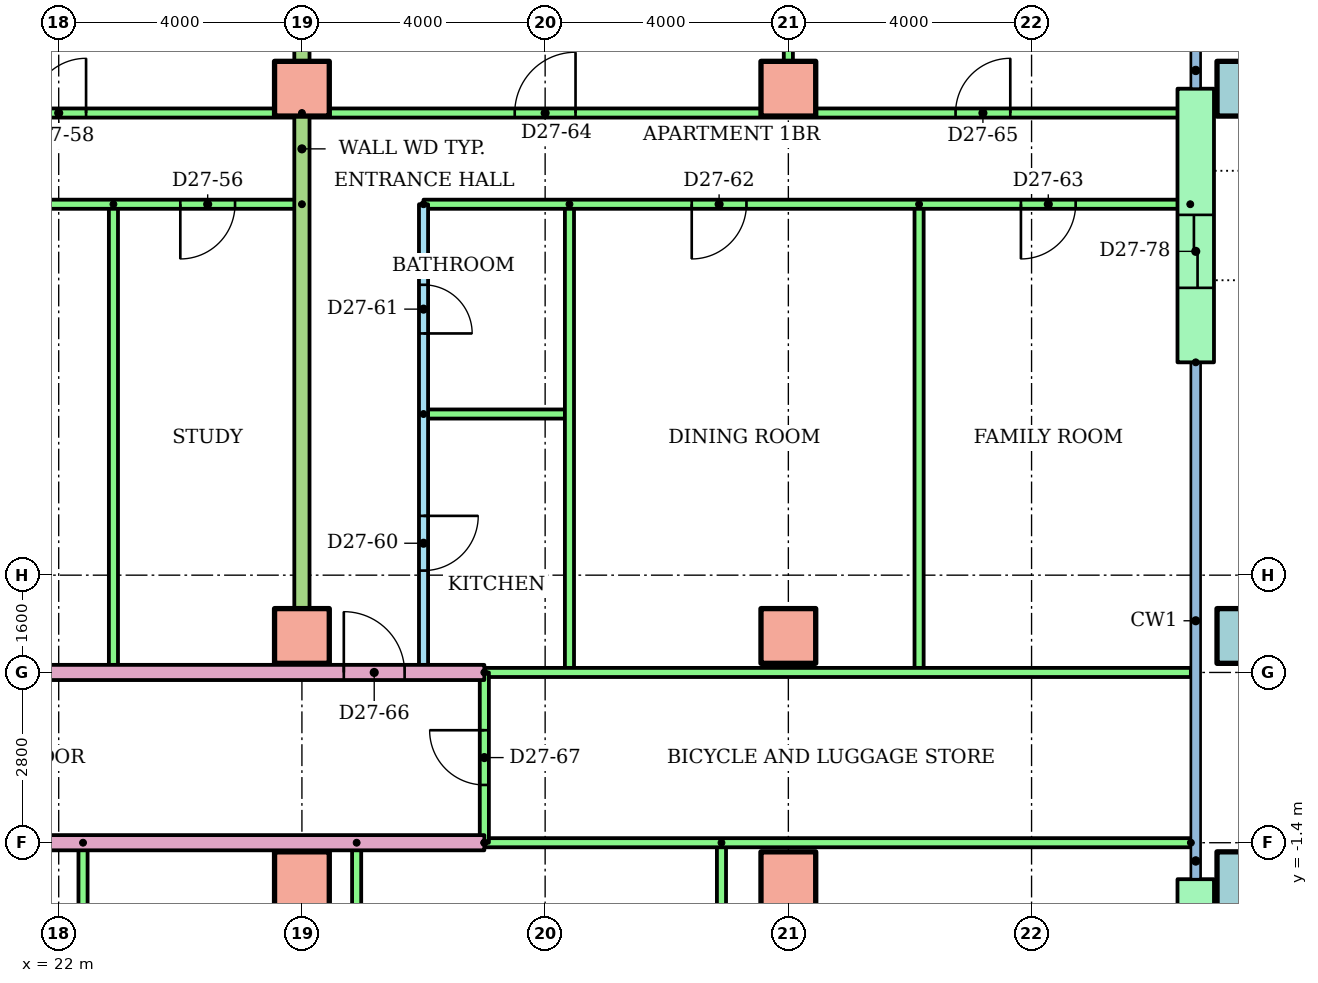
"""IFC4 building model, lengths in metres.
Left out: names, types, materials, properties, quantities, classifications, styles, units other than length and angle.
Written with IfcOpenShell. Run it as: python <this file> out.ifc"""

import sys

from ifc_helpers import new_model, si_unit, direction, frame, frame_2d, origin, origin_2d, place, context, subcontext, project, spatial, rectangle, hollow_rectangle, extrude, element, fill, save


model = new_model("IFC4")
c1 = context("Model", 3, precision=1e-05, world=origin(), true_north=direction((0.0, 1.0)))
c2 = subcontext(c1, "Body", "Model", "MODEL_VIEW")
j1 = project(units=[si_unit("LENGTHUNIT", "METRE"), si_unit("PLANEANGLEUNIT", "RADIAN")], contexts=[c1])
p1 = place(None, origin())
s1 = spatial("IfcSite", under=j1, at=p1, CompositionType="ELEMENT")
p2 = place(p1, origin())
s2 = spatial("IfcBuilding", under=s1, at=p2, CompositionType="ELEMENT")
p3 = place(p2, frame((0.0, 0.0, 103.1)))
s3 = spatial("IfcBuildingStorey", under=s2, at=p3, CompositionType="ELEMENT", Elevation=103.1)
for number, where in (
    (1, (26.0, -2.0, 0.0)),
    (2, (34.0, -2.0, 0.0)),
):
    element("IfcColumn", number, at=place(p3, frame(where)), inside=s3, PredefinedType="COLUMN", context=c2, shape_type="SweptSolid", body=[
        extrude(rectangle(XDim=0.9, YDim=0.9, at=origin_2d()), origin(), (0.0, 0.0, 1.0), 3.2),
    ])
p4 = place(p3, frame((41.5, -2.0, 0.0)))
e3 = element("IfcColumn", 3, at=p4, inside=s3, PredefinedType="COLUMN", context=c2, shape_type="SweptSolid", body=[
    extrude(hollow_rectangle(XDim=0.9, YDim=0.9, WallThickness=0.045, at=origin_2d()), origin(), (0.0, 0.0, 1.0), 3.2),
])
for number, where in (
    (4, (26.0, 2.0, 0.0)),
    (5, (34.0, 2.0, 0.0)),
):
    element("IfcColumn", number, at=place(p3, frame(where)), inside=s3, PredefinedType="COLUMN", context=c2, shape_type="SweptSolid", body=[
        extrude(rectangle(XDim=0.9, YDim=0.9, at=origin_2d()), origin(), (0.0, 0.0, 1.0), 3.2),
    ])
p5 = place(p3, frame((41.5, 2.0, 0.0)))
e6 = element("IfcColumn", 6, at=p5, inside=s3, PredefinedType="COLUMN", context=c2, shape_type="SweptSolid", body=[
    extrude(hollow_rectangle(XDim=0.9, YDim=0.9, WallThickness=0.045, at=origin_2d()), origin(), (0.0, 0.0, 1.0), 3.2),
])
for number, where in (
    (7, (26.0, 11.0, 0.0)),
    (8, (34.0, 11.0, 0.0)),
):
    element("IfcColumn", number, at=place(p3, frame(where)), inside=s3, PredefinedType="COLUMN", context=c2, shape_type="SweptSolid", body=[
        extrude(rectangle(XDim=0.9, YDim=0.9, at=origin_2d()), origin(), (0.0, 0.0, 1.0), 3.2),
    ])
p6 = place(p3, frame((41.5, 11.0, 0.0)))
e9 = element("IfcColumn", 9, at=p6, inside=s3, PredefinedType="COLUMN", context=c2, shape_type="SweptSolid", body=[
    extrude(hollow_rectangle(XDim=0.9, YDim=0.9, WallThickness=0.045, at=origin_2d()), origin(), (0.0, 0.0, 1.0), 3.2),
])
p7 = place(p3, frame((40.7, -5.7, 0.0), z_axis=(0.0, 0.0, 1.0), x_axis=(0.0, 1.0, 0.0)))
e10 = element("IfcWall", 10, at=p7, inside=s3, PredefinedType="STANDARD", context=c2, shape_type="SweptSolid", body=[
    extrude(rectangle(XDim=3.7, YDim=0.6, at=frame_2d((1.85, 0.0))), origin(), (0.0, 0.0, 1.0), 2.8),
])
p8 = place(p7, frame((1.25, 0.0, 0.0)))
e11 = element("IfcOpeningElement", 11, at=p8, cuts=e10, PredefinedType="OPENING", context=c2, shape_type="SweptSolid", body=[
    extrude(rectangle(XDim=1.2, YDim=2.1, at=frame_2d((0.6, 1.05))), frame((0.0, 0.31, 0.0), z_axis=(0.0, -1.0, 0.0), x_axis=(1.0, 0.0, 0.0)), (0.0, 0.0, 1.0), 0.62),
])
p9 = place(p3, frame((40.7, 6.5, 0.0), z_axis=(0.0, 0.0, 1.0), x_axis=(0.0, 1.0, 0.0)))
e12 = element("IfcWall", 12, at=p9, inside=s3, PredefinedType="STANDARD", context=c2, shape_type="SweptSolid", body=[
    extrude(rectangle(XDim=4.5, YDim=0.6, at=frame_2d((2.25, 0.0))), origin(), (0.0, 0.0, 1.0), 2.8),
])
p10 = place(p9, frame((1.225, 0.0, 0.0)))
e13 = element("IfcOpeningElement", 13, at=p10, cuts=e12, PredefinedType="OPENING", context=c2, shape_type="SweptSolid", body=[
    extrude(rectangle(XDim=1.2, YDim=2.1, at=frame_2d((0.6, 1.05))), frame((0.0, 0.31, 0.0), z_axis=(0.0, -1.0, 0.0), x_axis=(1.0, 0.0, 0.0)), (0.0, 0.0, 1.0), 0.62),
])
for number, where, z_axis, x_axis in (
    (14, (22.4, -1.4, 0.0), (0.0, 0.0, 1.0), (0.0, -1.0, 0.0)),
    (15, (26.9, -1.4, 0.0), (0.0, 0.0, 1.0), (0.0, -1.0, 0.0)),
    (16, (32.9, -1.4, 0.0), (0.0, 0.0, 1.0), (0.0, -1.0, 0.0)),
):
    element("IfcWall", number, at=place(p3, frame(where, z_axis=z_axis, x_axis=x_axis)), inside=s3, PredefinedType="PARTITIONING", context=c2, shape_type="SweptSolid", body=[
        extrude(rectangle(XDim=5.3, YDim=0.15, at=frame_2d((2.65, 0.0))), origin(), (0.0, 0.0, 1.0), 2.4),
    ])
p11 = place(p3, frame((29.0, -1.4, 0.0), z_axis=(0.0, 0.0, 1.0), x_axis=(-1.0, 0.0, 0.0)))
e17 = element("IfcWall", 17, at=p11, inside=s3, PredefinedType="PARTITIONING", context=c2, shape_type="SweptSolid", body=[
    extrude(rectangle(XDim=15.0, YDim=0.25, at=frame_2d((7.5, 0.0))), origin(), (0.0, 0.0, 1.0), 2.4),
])
p12 = place(p11, frame((9.311, 0.0, 0.0)))
e18 = element("IfcOpeningElement", 18, at=p12, cuts=e17, PredefinedType="OPENING", context=c2, shape_type="SweptSolid", body=[
    extrude(rectangle(XDim=1.0, YDim=2.1, at=frame_2d((0.5, 1.05))), frame((0.0, 0.135, 0.0), z_axis=(0.0, -1.0, 0.0), x_axis=(1.0, 0.0, 0.0)), (0.0, 0.0, 1.0), 0.27),
])
p13 = place(p3, frame((40.62, -1.4, 0.0), z_axis=(0.0, 0.0, 1.0), x_axis=(-1.0, 0.0, 0.0)))
e19 = element("IfcWall", 19, at=p13, inside=s3, PredefinedType="PARTITIONING", context=c2, shape_type="SweptSolid", body=[
    extrude(rectangle(XDim=11.62, YDim=0.15, at=frame_2d((5.81, 0.0))), origin(), (0.0, 0.0, 1.0), 2.4),
])
p14 = place(p3, frame((22.9, 9.1, 0.0), z_axis=(0.0, 0.0, 1.0), x_axis=(0.0, -1.0, 0.0)))
e20 = element("IfcWall", 20, at=p14, inside=s3, PredefinedType="PARTITIONING", context=c2, shape_type="SweptSolid", body=[
    extrude(rectangle(XDim=7.7, YDim=0.15, at=frame_2d((3.85, 0.0))), origin(), (0.0, 0.0, 1.0), 2.4),
])
p15 = place(p3, frame((26.0, 9.1, 0.0), z_axis=(0.0, 0.0, 1.0), x_axis=(-1.0, 0.0, 0.0)))
e21 = element("IfcWall", 21, at=p15, inside=s3, PredefinedType="PARTITIONING", context=c2, shape_type="SweptSolid", body=[
    extrude(rectangle(XDim=10.0, YDim=0.15, at=frame_2d((5.0, 0.0))), origin(), (0.0, 0.0, 1.0), 2.4),
])
p16 = place(p15, frame((4.9, 0.0, 0.0)))
e22 = element("IfcOpeningElement", 22, at=p16, cuts=e21, PredefinedType="OPENING", context=c2, shape_type="SweptSolid", body=[
    extrude(rectangle(XDim=0.9, YDim=2.1, at=frame_2d((0.45, 1.05))), frame((0.0, 0.085, 0.0), z_axis=(0.0, -1.0, 0.0), x_axis=(1.0, 0.0, 0.0)), (0.0, 0.0, 1.0), 0.17),
])
p17 = place(p15, frame((1.1, 0.0, 0.0)))
e23 = element("IfcOpeningElement", 23, at=p17, cuts=e21, PredefinedType="OPENING", context=c2, shape_type="SweptSolid", body=[
    extrude(rectangle(XDim=0.9, YDim=2.1, at=frame_2d((0.45, 1.05))), frame((0.0, 0.085, 0.0), z_axis=(0.0, -1.0, 0.0), x_axis=(1.0, 0.0, 0.0)), (0.0, 0.0, 1.0), 0.17),
])
p18 = place(p3, frame((14.0, 10.6, 0.0)))
e24 = element("IfcWall", 24, at=p18, inside=s3, PredefinedType="PARTITIONING", context=c2, shape_type="SweptSolid", body=[
    extrude(rectangle(XDim=12.0, YDim=0.15, at=frame_2d((6.0, 0.0))), origin(), (0.0, 0.0, 1.0), 2.4),
])
p19 = place(p18, frame((1.5, 0.0, 0.0)))
e25 = element("IfcOpeningElement", 25, at=p19, cuts=e24, PredefinedType="OPENING", context=c2, shape_type="SweptSolid", body=[
    extrude(rectangle(XDim=1.0, YDim=2.1, at=frame_2d((0.5, 1.05))), frame((0.0, 0.085, 0.0), z_axis=(0.0, -1.0, 0.0), x_axis=(1.0, 0.0, 0.0)), (0.0, 0.0, 1.0), 0.17),
])
p20 = place(p18, frame((7.55, 0.0, 0.0)))
e26 = element("IfcOpeningElement", 26, at=p20, cuts=e24, PredefinedType="OPENING", context=c2, shape_type="SweptSolid", body=[
    extrude(rectangle(XDim=0.9, YDim=2.1, at=frame_2d((0.45, 1.05))), frame((0.0, 0.085, 0.0), z_axis=(0.0, -1.0, 0.0), x_axis=(1.0, 0.0, 0.0)), (0.0, 0.0, 1.0), 0.17),
])
p21 = place(p3, frame((28.0, 9.1, 0.0), z_axis=(0.0, 0.0, 1.0), x_axis=(0.0, -1.0, 0.0)))
e27 = element("IfcWall", 27, at=p21, inside=s3, PredefinedType="PARTITIONING", context=c2, shape_type="SweptSolid", body=[
    extrude(rectangle(XDim=7.7, YDim=0.15, at=frame_2d((3.85, 0.0))), origin(), (0.0, 0.0, 1.0), 2.4),
])
p22 = place(p21, frame((5.125, 0.0, 0.0)))
e28 = element("IfcOpeningElement", 28, at=p22, cuts=e27, PredefinedType="OPENING", context=c2, shape_type="SweptSolid", body=[
    extrude(rectangle(XDim=0.9, YDim=2.1, at=frame_2d((0.45, 1.05))), frame((0.0, 0.085, 0.0), z_axis=(0.0, -1.0, 0.0), x_axis=(1.0, 0.0, 0.0)), (0.0, 0.0, 1.0), 0.17),
])
p23 = place(p21, frame((1.325, 0.0, 0.0)))
e29 = element("IfcOpeningElement", 29, at=p23, cuts=e27, PredefinedType="OPENING", context=c2, shape_type="SweptSolid", body=[
    extrude(rectangle(XDim=0.8, YDim=2.1, at=frame_2d((0.4, 1.05))), frame((0.0, 0.085, 0.0), z_axis=(0.0, -1.0, 0.0), x_axis=(1.0, 0.0, 0.0)), (0.0, 0.0, 1.0), 0.17),
])
p24 = place(p3, frame((28.0, 5.65, 0.0)))
e30 = element("IfcWall", 30, at=p24, inside=s3, PredefinedType="PARTITIONING", context=c2, shape_type="SweptSolid", body=[
    extrude(rectangle(XDim=2.4, YDim=0.15, at=frame_2d((1.2, 0.0))), origin(), (0.0, 0.0, 1.0), 2.4),
])
for number, where, z_axis, x_axis in (
    (31, (30.4, 9.1, 0.0), (0.0, 0.0, 1.0), (0.0, -1.0, 0.0)),
    (32, (36.15, 9.1, 0.0), (0.0, 0.0, 1.0), (0.0, -1.0, 0.0)),
):
    element("IfcWall", number, at=place(p3, frame(where, z_axis=z_axis, x_axis=x_axis)), inside=s3, PredefinedType="PARTITIONING", context=c2, shape_type="SweptSolid", body=[
        extrude(rectangle(XDim=7.7, YDim=0.15, at=frame_2d((3.85, 0.0))), origin(), (0.0, 0.0, 1.0), 2.4),
    ])
p25 = place(p3, frame((40.61, 9.1, 0.0), z_axis=(0.0, 0.0, 1.0), x_axis=(-1.0, 0.0, 0.0)))
e33 = element("IfcWall", 33, at=p25, inside=s3, PredefinedType="PARTITIONING", context=c2, shape_type="SweptSolid", body=[
    extrude(rectangle(XDim=12.61, YDim=0.15, at=frame_2d((6.305, 0.0))), origin(), (0.0, 0.0, 1.0), 2.4),
])
p26 = place(p25, frame((7.299, 0.0, 0.0)))
e34 = element("IfcOpeningElement", 34, at=p26, cuts=e33, PredefinedType="OPENING", context=c2, shape_type="SweptSolid", body=[
    extrude(rectangle(XDim=0.9, YDim=2.1, at=frame_2d((0.45, 1.05))), frame((0.0, 0.085, 0.0), z_axis=(0.0, -1.0, 0.0), x_axis=(1.0, 0.0, 0.0)), (0.0, 0.0, 1.0), 0.17),
])
p27 = place(p25, frame((1.885, 0.0, 0.0)))
e35 = element("IfcOpeningElement", 35, at=p27, cuts=e33, PredefinedType="OPENING", context=c2, shape_type="SweptSolid", body=[
    extrude(rectangle(XDim=0.9, YDim=2.1, at=frame_2d((0.45, 1.05))), frame((0.0, 0.085, 0.0), z_axis=(0.0, -1.0, 0.0), x_axis=(1.0, 0.0, 0.0)), (0.0, 0.0, 1.0), 0.17),
])
p28 = place(p3, frame((26.0, 10.6, 0.0)))
e36 = element("IfcWall", 36, at=p28, inside=s3, PredefinedType="PARTITIONING", context=c2, shape_type="SweptSolid", body=[
    extrude(rectangle(XDim=14.61, YDim=0.15, at=frame_2d((7.305, 0.0))), origin(), (0.0, 0.0, 1.0), 2.4),
])
p29 = place(p28, frame((3.5, 0.0, 0.0)))
e37 = element("IfcOpeningElement", 37, at=p29, cuts=e36, PredefinedType="OPENING", context=c2, shape_type="SweptSolid", body=[
    extrude(rectangle(XDim=1.0, YDim=2.1, at=frame_2d((0.5, 1.05))), frame((0.0, 0.085, 0.0), z_axis=(0.0, -1.0, 0.0), x_axis=(1.0, 0.0, 0.0)), (0.0, 0.0, 1.0), 0.17),
])
p30 = place(p28, frame((10.75, 0.0, 0.0)))
e38 = element("IfcOpeningElement", 38, at=p30, cuts=e36, PredefinedType="OPENING", context=c2, shape_type="SweptSolid", body=[
    extrude(rectangle(XDim=0.9, YDim=2.1, at=frame_2d((0.45, 1.05))), frame((0.0, 0.085, 0.0), z_axis=(0.0, -1.0, 0.0), x_axis=(1.0, 0.0, 0.0)), (0.0, 0.0, 1.0), 0.17),
])
p31 = place(p3, frame((34.0, 18.621, 0.0), z_axis=(0.0, 0.0, 1.0), x_axis=(0.0, -1.0, 0.0)))
e39 = element("IfcWall", 39, at=p31, inside=s3, PredefinedType="PARTITIONING", context=c2, shape_type="SweptSolid", body=[
    extrude(rectangle(XDim=8.021, YDim=0.15, at=frame_2d((4.01, 0.0))), origin(), (0.0, 0.0, 1.0), 2.4),
])
p32 = place(p3, frame((26.0, 18.621, 0.0), z_axis=(0.0, 0.0, 1.0), x_axis=(0.0, -1.0, 0.0)))
e40 = element("IfcWall", 40, at=p32, inside=s3, PredefinedType="PARTITIONING", context=c2, shape_type="SweptSolid", body=[
    extrude(rectangle(XDim=17.221, YDim=0.25, at=frame_2d((8.611, 0.0))), origin(), (0.0, 0.0, 1.0), 2.4),
])
p33 = place(p3, frame((14.0, 1.4, 0.0)))
e41 = element("IfcWall", 41, at=p33, inside=s3, PredefinedType="PARTITIONING", context=c2, shape_type="SweptSolid", body=[
    extrude(rectangle(XDim=15.0, YDim=0.25, at=frame_2d((7.5, 0.0))), origin(), (0.0, 0.0, 1.0), 2.4),
])
p34 = place(p33, frame((0.5, 0.0, 0.0)))
e42 = element("IfcOpeningElement", 42, at=p34, cuts=e41, PredefinedType="OPENING", context=c2, shape_type="SweptSolid", body=[
    extrude(rectangle(XDim=1.0, YDim=2.1, at=frame_2d((0.5, 1.05))), frame((0.0, 0.135, 0.0), z_axis=(0.0, -1.0, 0.0), x_axis=(1.0, 0.0, 0.0)), (0.0, 0.0, 1.0), 0.27),
])
p35 = place(p33, frame((12.689, 0.0, 0.0)))
e43 = element("IfcOpeningElement", 43, at=p35, cuts=e41, PredefinedType="OPENING", context=c2, shape_type="SweptSolid", body=[
    extrude(rectangle(XDim=1.0, YDim=2.1, at=frame_2d((0.5, 1.05))), frame((0.0, 0.135, 0.0), z_axis=(0.0, -1.0, 0.0), x_axis=(1.0, 0.0, 0.0)), (0.0, 0.0, 1.0), 0.27),
])
p36 = place(p3, frame((29.0, 1.4, 0.0)))
e44 = element("IfcWall", 44, at=p36, inside=s3, PredefinedType="PARTITIONING", context=c2, shape_type="SweptSolid", body=[
    extrude(rectangle(XDim=11.62, YDim=0.15, at=frame_2d((5.81, 0.0))), origin(), (0.0, 0.0, 1.0), 2.4),
])
p37 = place(p3, frame((29.0, -1.4, 0.0), z_axis=(0.0, 0.0, 1.0), x_axis=(0.0, 1.0, 0.0)))
e45 = element("IfcWall", 45, at=p37, inside=s3, PredefinedType="PARTITIONING", context=c2, shape_type="SweptSolid", body=[
    extrude(rectangle(XDim=2.8, YDim=0.15, at=frame_2d((1.4, 0.0))), origin(), (0.0, 0.0, 1.0), 2.4),
])
p38 = place(p37, frame((0.95, 0.0, 0.0)))
e46 = element("IfcOpeningElement", 46, at=p38, cuts=e45, PredefinedType="OPENING", context=c2, shape_type="SweptSolid", body=[
    extrude(rectangle(XDim=0.9, YDim=2.1, at=frame_2d((0.45, 1.05))), frame((0.0, 0.085, 0.0), z_axis=(0.0, -1.0, 0.0), x_axis=(1.0, 0.0, 0.0)), (0.0, 0.0, 1.0), 0.17),
])
p39 = place(p17, origin())
e47 = element("IfcDoor", 47, at=p39, inside=s3, OperationType="SINGLE_SWING_RIGHT", PredefinedType="DOOR", context=c2, shape_type="SweptSolid", body=[
    extrude(rectangle(XDim=0.9, YDim=2.1, at=frame_2d((0.45, 1.05))), frame((0.0, 0.025, 0.0), z_axis=(0.0, -1.0, 0.0), x_axis=(1.0, 0.0, 0.0)), (0.0, 0.0, 1.0), 0.05),
])
fill(e23, e47)
p40 = place(p20, origin())
e48 = element("IfcDoor", 48, at=p40, inside=s3, OperationType="SINGLE_SWING_RIGHT", PredefinedType="DOOR", context=c2, shape_type="SweptSolid", body=[
    extrude(rectangle(XDim=0.9, YDim=2.1, at=frame_2d((0.45, 1.05))), frame((0.0, 0.025, 0.0), z_axis=(0.0, -1.0, 0.0), x_axis=(1.0, 0.0, 0.0)), (0.0, 0.0, 1.0), 0.05),
])
fill(e26, e48)
p41 = place(p22, origin())
e49 = element("IfcDoor", 49, at=p41, inside=s3, OperationType="SINGLE_SWING_LEFT", PredefinedType="DOOR", context=c2, shape_type="SweptSolid", body=[
    extrude(rectangle(XDim=0.9, YDim=2.1, at=frame_2d((0.45, 1.05))), frame((0.0, 0.025, 0.0), z_axis=(0.0, -1.0, 0.0), x_axis=(1.0, 0.0, 0.0)), (0.0, 0.0, 1.0), 0.05),
])
fill(e28, e49)
p42 = place(p23, origin())
e50 = element("IfcDoor", 50, at=p42, inside=s3, OperationType="SINGLE_SWING_RIGHT", PredefinedType="DOOR", context=c2, shape_type="SweptSolid", body=[
    extrude(rectangle(XDim=0.8, YDim=2.1, at=frame_2d((0.4, 1.05))), frame((0.0, 0.025, 0.0), z_axis=(0.0, -1.0, 0.0), x_axis=(1.0, 0.0, 0.0)), (0.0, 0.0, 1.0), 0.05),
])
fill(e29, e50)
p43 = place(p26, origin())
e51 = element("IfcDoor", 51, at=p43, inside=s3, OperationType="SINGLE_SWING_RIGHT", PredefinedType="DOOR", context=c2, shape_type="SweptSolid", body=[
    extrude(rectangle(XDim=0.9, YDim=2.1, at=frame_2d((0.45, 1.05))), frame((0.0, 0.025, 0.0), z_axis=(0.0, -1.0, 0.0), x_axis=(1.0, 0.0, 0.0)), (0.0, 0.0, 1.0), 0.05),
])
fill(e34, e51)
p44 = place(p27, origin())
e52 = element("IfcDoor", 52, at=p44, inside=s3, OperationType="SINGLE_SWING_RIGHT", PredefinedType="DOOR", context=c2, shape_type="SweptSolid", body=[
    extrude(rectangle(XDim=0.9, YDim=2.1, at=frame_2d((0.45, 1.05))), frame((0.0, 0.025, 0.0), z_axis=(0.0, -1.0, 0.0), x_axis=(1.0, 0.0, 0.0)), (0.0, 0.0, 1.0), 0.05),
])
fill(e35, e52)
p45 = place(p29, origin())
e53 = element("IfcDoor", 53, at=p45, inside=s3, OperationType="SINGLE_SWING_RIGHT", PredefinedType="DOOR", context=c2, shape_type="SweptSolid", body=[
    extrude(rectangle(XDim=1.0, YDim=2.1, at=frame_2d((0.5, 1.05))), frame((0.0, 0.025, 0.0), z_axis=(0.0, -1.0, 0.0), x_axis=(1.0, 0.0, 0.0)), (0.0, 0.0, 1.0), 0.05),
])
fill(e37, e53)
p46 = place(p30, origin())
e54 = element("IfcDoor", 54, at=p46, inside=s3, OperationType="SINGLE_SWING_RIGHT", PredefinedType="DOOR", context=c2, shape_type="SweptSolid", body=[
    extrude(rectangle(XDim=0.9, YDim=2.1, at=frame_2d((0.45, 1.05))), frame((0.0, 0.025, 0.0), z_axis=(0.0, -1.0, 0.0), x_axis=(1.0, 0.0, 0.0)), (0.0, 0.0, 1.0), 0.05),
])
fill(e38, e54)
p47 = place(p35, origin())
e55 = element("IfcDoor", 55, at=p47, inside=s3, OperationType="SINGLE_SWING_LEFT", PredefinedType="DOOR", context=c2, shape_type="SweptSolid", body=[
    extrude(rectangle(XDim=1.0, YDim=2.1, at=frame_2d((0.5, 1.05))), frame((0.0, 0.025, 0.0), z_axis=(0.0, -1.0, 0.0), x_axis=(1.0, 0.0, 0.0)), (0.0, 0.0, 1.0), 0.05),
])
fill(e43, e55)
p48 = place(p38, origin())
e56 = element("IfcDoor", 56, at=p48, inside=s3, OperationType="SINGLE_SWING_RIGHT", PredefinedType="DOOR", context=c2, shape_type="SweptSolid", body=[
    extrude(rectangle(XDim=0.9, YDim=2.1, at=frame_2d((0.45, 1.05))), frame((0.0, 0.025, 0.0), z_axis=(0.0, -1.0, 0.0), x_axis=(1.0, 0.0, 0.0)), (0.0, 0.0, 1.0), 0.05),
])
fill(e46, e56)
p49 = place(p10, origin())
e57 = element("IfcDoor", 57, at=p49, inside=s3, OperationType="SLIDING_TO_LEFT", PredefinedType="DOOR", context=c2, shape_type="SweptSolid", body=[
    extrude(rectangle(XDim=1.2, YDim=2.1, at=frame_2d((0.6, 1.05))), frame((0.0, 0.025, 0.0), z_axis=(0.0, -1.0, 0.0), x_axis=(1.0, 0.0, 0.0)), (0.0, 0.0, 1.0), 0.05),
])
fill(e13, e57)
save(model, sys.argv[1])
